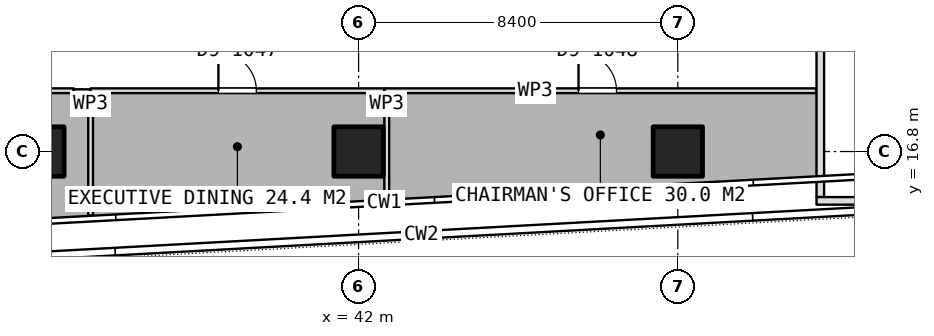
"""IFC4 building model, lengths in metres.
Left out: names, types, materials, properties, quantities, classifications, styles, units other than length and angle.
Written with IfcOpenShell. Run it as: python <this file> out.ifc"""

import sys

from ifc_helpers import new_model, si_unit, direction, frame, frame_2d, origin, origin_2d, place, context, subcontext, project, spatial, rectangle, extrude, element, fill, save


model = new_model("IFC4")
c1 = context("Model", 3, precision=1e-05, world=origin(), true_north=direction((0.0, 1.0)))
c2 = subcontext(c1, "Body", "Model", "MODEL_VIEW")
j1 = project(units=[si_unit("LENGTHUNIT", "METRE"), si_unit("PLANEANGLEUNIT", "RADIAN")], contexts=[c1])
p1 = place(None, origin())
s1 = spatial("IfcSite", under=j1, at=p1, CompositionType="ELEMENT")
p2 = place(p1, origin())
s2 = spatial("IfcBuilding", under=s1, at=p2, CompositionType="ELEMENT")
p3 = place(p2, frame((0.0, 0.0, 283.85)))
s3 = spatial("IfcBuildingStorey", under=s2, at=p3, CompositionType="ELEMENT", Elevation=283.85)
for number, where, z_axis, x_axis in (
    (1, (33.6, 16.8, 0.0), (0.0, 0.0, 1.0), (1.0, 0.0, 0.0)),
    (2, (42.0, 16.8, 0.0), (0.0, 0.0, 1.0), (1.0, 0.0, 0.0)),
    (3, (50.4, 16.8, 0.0), (0.0, 0.0, 1.0), (1.0, 0.0, 0.0)),
):
    element("IfcColumn", number, at=place(p3, frame(where, z_axis=z_axis, x_axis=x_axis)), inside=s3, PredefinedType="COLUMN", context=c2, shape_type="SweptSolid", body=[
        extrude(rectangle(XDim=1.3, YDim=1.3, at=origin_2d()), origin(), (0.0, 0.0, 1.0), 3.75),
    ])
p4 = place(p3, frame((42.674, 18.4, 0.0), z_axis=(0.0, 0.0, 1.0), x_axis=(1.0, 0.0, 0.0)))
e4 = element("IfcWall", 4, at=p4, inside=s3, PredefinedType="PARTITIONING", context=c2, shape_type="SweptSolid", body=[
    extrude(rectangle(XDim=11.365, YDim=0.125, at=frame_2d((5.683, 0.0))), origin(), (0.0, 0.0, 1.0), 3.5),
])
p5 = place(p4, frame((5.113, 0.0, 0.0)))
e5 = element("IfcOpeningElement", 5, at=p5, cuts=e4, PredefinedType="OPENING", context=c2, shape_type="SweptSolid", body=[
    extrude(rectangle(XDim=1.0, YDim=2.1, at=frame_2d((0.5, 1.05))), frame((0.0, 0.073, 0.0), z_axis=(0.0, -1.0, 0.0), x_axis=(1.0, 0.0, 0.0)), (0.0, 0.0, 1.0), 0.145),
])
p6 = place(p3, frame((42.742, 15.538, 0.0), z_axis=(0.0, 0.0, 1.0), x_axis=(0.0, 1.0, 0.0)))
e6 = element("IfcWall", 6, at=p6, inside=s3, PredefinedType="PARTITIONING", context=c2, shape_type="SweptSolid", body=[
    extrude(rectangle(XDim=2.799, YDim=0.125, at=frame_2d((1.399, 0.0))), origin(), (0.0, 0.0, 1.0), 3.5),
])
p7 = place(p3, frame((34.948, 18.375, 0.0), z_axis=(0.0, 0.0, 1.0), x_axis=(0.0, -1.0, 0.0)))
e7 = element("IfcWall", 7, at=p7, inside=s3, PredefinedType="PARTITIONING", context=c2, shape_type="SweptSolid", body=[
    extrude(rectangle(XDim=3.261, YDim=0.125, at=frame_2d((1.63, 0.0))), origin(), (0.0, 0.0, 1.0), 3.5),
])
p8 = place(p3, frame((25.207, 18.4, 0.0), z_axis=(0.0, 0.0, 1.0), x_axis=(1.0, 0.0, 0.0)))
e8 = element("IfcWall", 8, at=p8, inside=s3, PredefinedType="PARTITIONING", context=c2, shape_type="SweptSolid", body=[
    extrude(rectangle(XDim=9.297, YDim=0.125, at=frame_2d((4.648, 0.0))), origin(), (0.0, 0.0, 1.0), 3.5),
])
p9 = place(p8, frame((4.148, 0.0, 0.0)))
e9 = element("IfcOpeningElement", 9, at=p9, cuts=e8, PredefinedType="OPENING", context=c2, shape_type="SweptSolid", body=[
    extrude(rectangle(XDim=1.0, YDim=2.1, at=frame_2d((0.5, 1.05))), frame((0.0, 0.073, 0.0), z_axis=(0.0, -1.0, 0.0), x_axis=(1.0, 0.0, 0.0)), (0.0, 0.0, 1.0), 0.145),
])
p10 = place(p3, frame((34.504, 18.375, 0.0), z_axis=(0.0, 0.0, 1.0), x_axis=(1.0, 0.0, 0.0)))
e10 = element("IfcWall", 10, at=p10, inside=s3, PredefinedType="PARTITIONING", context=c2, shape_type="SweptSolid", body=[
    extrude(rectangle(XDim=0.444, YDim=0.125, at=frame_2d((0.222, 0.0))), origin(), (0.0, 0.0, 1.0), 3.5),
])
p11 = place(p3, frame((34.948, 18.4, 0.0), z_axis=(0.0, 0.0, 1.0), x_axis=(1.0, 0.0, 0.0)))
e11 = element("IfcWall", 11, at=p11, inside=s3, PredefinedType="PARTITIONING", context=c2, shape_type="SweptSolid", body=[
    extrude(rectangle(XDim=7.726, YDim=0.125, at=frame_2d((3.863, 0.0))), origin(), (0.0, 0.0, 1.0), 3.5),
])
p12 = place(p11, frame((3.363, 0.0, 0.0)))
e12 = element("IfcOpeningElement", 12, at=p12, cuts=e11, PredefinedType="OPENING", context=c2, shape_type="SweptSolid", body=[
    extrude(rectangle(XDim=1.0, YDim=2.1, at=frame_2d((0.5, 1.05))), frame((0.0, 0.073, 0.0), z_axis=(0.0, -1.0, 0.0), x_axis=(1.0, 0.0, 0.0)), (0.0, 0.0, 1.0), 0.145),
])
p13 = place(p3, frame((54.15, 15.602, 0.0), z_axis=(0.0, 0.0, 1.0), x_axis=(0.0, 1.0, 0.0)))
e13 = element("IfcWall", 13, at=p13, inside=s3, PredefinedType="PARTITIONING", context=c2, shape_type="SweptSolid", body=[
    extrude(rectangle(XDim=35.995, YDim=0.2, at=frame_2d((17.998, 0.0))), origin(), (0.0, 0.0, 1.0), 3.5),
])
p14 = place(p13, frame((21.598, 0.0, 0.0)))
e14 = element("IfcOpeningElement", 14, at=p14, cuts=e13, PredefinedType="OPENING", context=c2, shape_type="SweptSolid", body=[
    extrude(rectangle(XDim=1.2, YDim=2.1, at=frame_2d((0.6, 1.05))), frame((0.0, 0.11, 0.0), z_axis=(0.0, -1.0, 0.0), x_axis=(1.0, 0.0, 0.0)), (0.0, 0.0, 1.0), 0.22),
])
p15 = place(p3, frame((54.05, 15.502, 0.0), z_axis=(0.0, 0.0, 1.0), x_axis=(1.0, 0.0, 0.0)))
e15 = element("IfcWall", 15, at=p15, inside=s3, PredefinedType="PARTITIONING", context=c2, shape_type="SweptSolid", body=[
    extrude(rectangle(XDim=6.11, YDim=0.2, at=frame_2d((3.055, 0.0))), origin(), (0.0, 0.0, 1.0), 3.5),
])
p16 = place(p5, origin())
e16 = element("IfcDoor", 16, at=p16, inside=s3, OperationType="SINGLE_SWING_LEFT", PredefinedType="DOOR", context=c2, shape_type="SweptSolid", body=[
    extrude(rectangle(XDim=1.0, YDim=2.1, at=frame_2d((0.5, 1.05))), frame((0.0, 0.025, 0.0), z_axis=(0.0, -1.0, 0.0), x_axis=(1.0, 0.0, 0.0)), (0.0, 0.0, 1.0), 0.05),
])
fill(e5, e16)
p17 = place(p12, origin())
e17 = element("IfcDoor", 17, at=p17, inside=s3, OperationType="SINGLE_SWING_LEFT", PredefinedType="DOOR", context=c2, shape_type="SweptSolid", body=[
    extrude(rectangle(XDim=1.0, YDim=2.1, at=frame_2d((0.5, 1.05))), frame((0.0, 0.025, 0.0), z_axis=(0.0, -1.0, 0.0), x_axis=(1.0, 0.0, 0.0)), (0.0, 0.0, 1.0), 0.05),
])
fill(e12, e17)
save(model, sys.argv[1])
